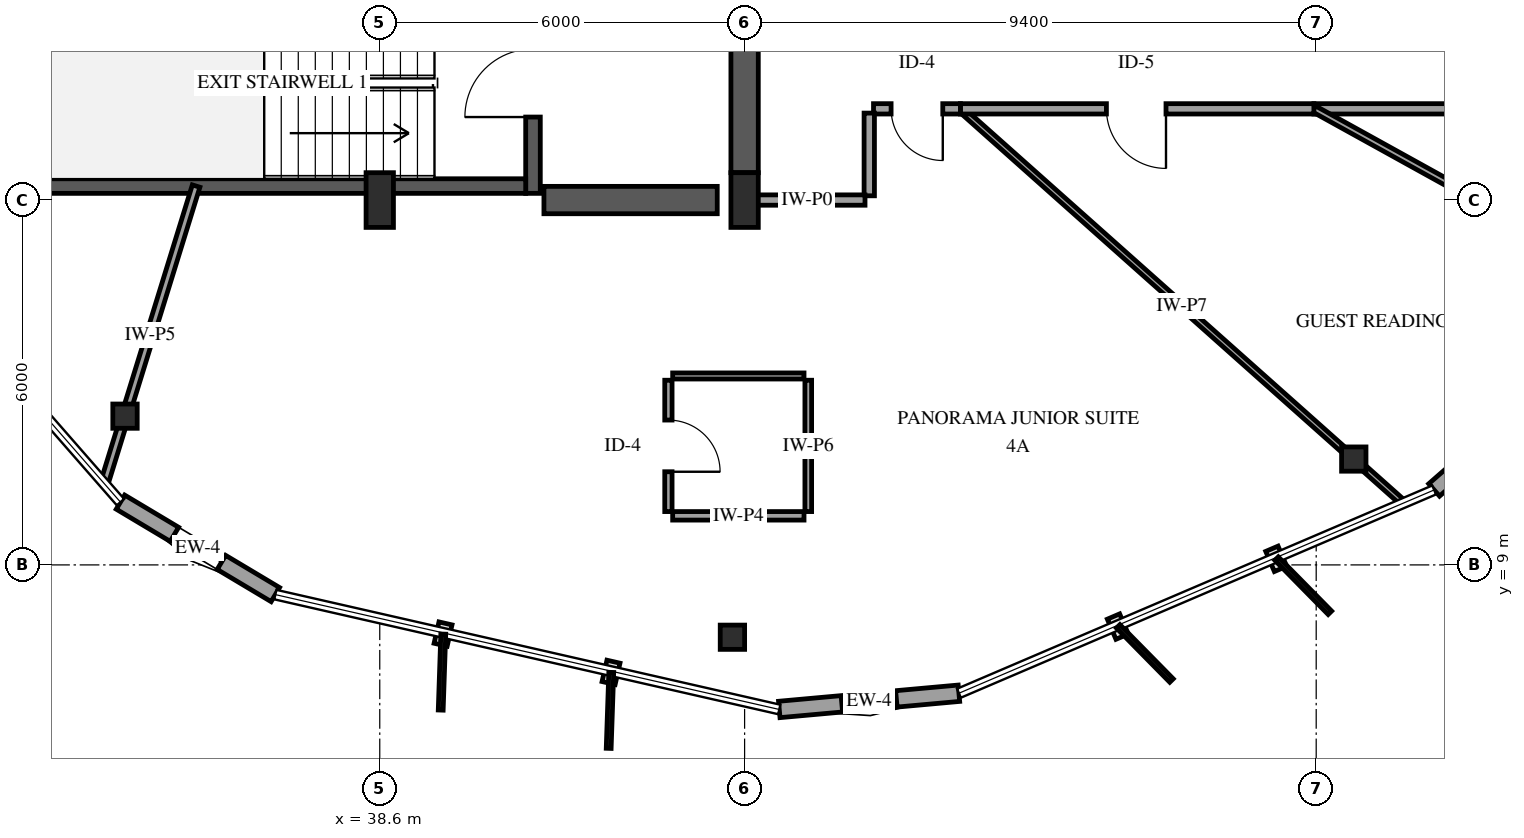
"""IFC4 building model, lengths in metres.
Left out: names, types, materials, properties, quantities, classifications, styles, units other than length and angle.
Written with IfcOpenShell. Run it as: python <this file> out.ifc"""

import sys

from ifc_helpers import new_model, si_unit, direction, frame, frame_2d, origin, origin_2d, place, context, subcontext, project, spatial, rectangle, i_section, extrude, element, fill, save


model = new_model("IFC4")
c1 = context("Model", 3, precision=1e-05, world=origin(), true_north=direction((0.0, 1.0)))
c2 = subcontext(c1, "Body", "Model", "MODEL_VIEW")
j1 = project(units=[si_unit("LENGTHUNIT", "METRE"), si_unit("PLANEANGLEUNIT", "RADIAN")], contexts=[c1])
p1 = place(None, origin())
s1 = spatial("IfcSite", under=j1, at=p1, CompositionType="ELEMENT")
p2 = place(p1, origin())
s2 = spatial("IfcBuilding", under=s1, at=p2, CompositionType="ELEMENT")
p3 = place(p2, frame((0.0, 0.0, 250.0)))
s3 = spatial("IfcBuildingStorey", under=s2, at=p3, CompositionType="ELEMENT", Elevation=250.0)
p4 = place(p3, frame((41.12, 15.11, 0.0), z_axis=(0.0, 0.0, 1.0), x_axis=(0.0, 1.0, 0.0)))
e1 = element("IfcWall", 1, at=p4, inside=s3, PredefinedType="SHEAR", context=c2, shape_type="SweptSolid", body=[
    extrude(rectangle(XDim=3.63, YDim=0.24, at=frame_2d((1.815, 0.0))), origin(), (0.0, 0.0, 1.0), 3.75),
])
p5 = place(p4, frame((1.255, 0.0, 0.0)))
e2 = element("IfcOpeningElement", 2, at=p5, cuts=e1, PredefinedType="OPENING", context=c2, shape_type="SweptSolid", body=[
    extrude(rectangle(XDim=1.12, YDim=2.15, at=frame_2d((0.56, 1.075))), frame((0.0, 0.13, 0.0), z_axis=(0.0, -1.0, 0.0), x_axis=(1.0, 0.0, 0.0)), (0.0, 0.0, 1.0), 0.26),
])
p6 = place(p3, frame((33.0, 15.23, 0.0), z_axis=(0.0, 0.0, 1.0), x_axis=(1.0, 0.0, 0.0)))
e3 = element("IfcWall", 3, at=p6, inside=s3, PredefinedType="SHEAR", context=c2, shape_type="SweptSolid", body=[
    extrude(rectangle(XDim=8.0, YDim=0.24, at=frame_2d((4.0, 0.0))), origin(), (0.0, 0.0, 1.0), 3.75),
])
p7 = place(p3, frame((41.3, 15.0, 0.0), z_axis=(0.0, 0.0, 1.0), x_axis=(1.0, 0.0, 0.0)))
e4 = element("IfcWall", 4, at=p7, inside=s3, PredefinedType="SHEAR", context=c2, shape_type="SweptSolid", body=[
    extrude(rectangle(XDim=2.85, YDim=0.45, at=frame_2d((1.425, 0.0))), origin(), (0.0, 0.0, 1.0), 3.75),
])
p8 = place(p3, frame((44.6, 15.45, 0.0), z_axis=(0.0, 0.0, 1.0), x_axis=(0.0, 1.0, 0.0)))
e5 = element("IfcWall", 5, at=p8, inside=s3, PredefinedType="SHEAR", context=c2, shape_type="SweptSolid", body=[
    extrude(rectangle(XDim=6.35, YDim=0.45, at=frame_2d((3.175, 0.0))), origin(), (0.0, 0.0, 1.0), 3.75),
])
for number, where, z_axis, x_axis in (
    (6, (38.6, 15.0, 0.0), (0.0, 0.0, 1.0), (1.0, 0.0, 0.0)),
    (7, (44.6, 15.0, 0.0), (0.0, 0.0, 1.0), (1.0, 0.0, 0.0)),
):
    element("IfcColumn", number, at=place(p3, frame(where, z_axis=z_axis, x_axis=x_axis)), inside=s3, PredefinedType="PILASTER", context=c2, shape_type="SweptSolid", body=[
        extrude(rectangle(XDim=0.45, YDim=0.9, at=origin_2d()), origin(), (0.0, 0.0, 1.0), 3.75),
    ])
for number, where, z_axis, x_axis in (
    (8, (34.411, 11.446, 0.0), (0.0, 0.0, 1.0), (1.0, 0.0, 0.0)),
    (9, (44.4, 7.811, 0.0), (0.0, 0.0, 1.0), (1.0, 0.0, 0.0)),
    (10, (54.618, 10.74, 0.0), (0.0, 0.0, 1.0), (1.0, 0.0, 0.0)),
):
    element("IfcColumn", number, at=place(p3, frame(where, z_axis=z_axis, x_axis=x_axis)), inside=s3, PredefinedType="COLUMN", context=c2, shape_type="SweptSolid", body=[
        extrude(i_section(OverallWidth=0.401, OverallDepth=0.399, WebThickness=0.025, FlangeThickness=0.04, FilletRadius=0.038, at=origin_2d()), origin(), (0.0, 0.0, 1.0), 3.75),
    ])
p9 = place(p3, frame((34.336, 10.032, 0.0), z_axis=(0.0, 0.0, 1.0), x_axis=(0.858609177154, -0.512630745183, 0.0)))
e11 = element("IfcWall", 11, at=p9, inside=s3, PredefinedType="SOLIDWALL", context=c2, shape_type="SweptSolid", body=[
    extrude(rectangle(XDim=2.967, YDim=0.27, at=frame_2d((1.483, 0.0))), origin(), (0.0, 0.0, 1.0), 2.829),
])
p10 = place(p9, frame((1.033, 0.0, 0.75)))
e12 = element("IfcOpeningElement", 12, at=p10, cuts=e11, PredefinedType="OPENING", context=c2, shape_type="SweptSolid", body=[
    extrude(rectangle(XDim=0.9, YDim=1.5, at=frame_2d((0.45, 0.75))), frame((0.0, 0.145, 0.0), z_axis=(0.0, -1.0, 0.0), x_axis=(1.0, 0.0, 0.0)), (0.0, 0.0, 1.0), 0.29),
])
p11 = place(p3, frame((45.17, 6.623, 0.0), z_axis=(0.0, 0.0, 1.0), x_axis=(0.995946323989, 0.089949539921, 0.0)))
e13 = element("IfcWall", 13, at=p11, inside=s3, PredefinedType="SOLIDWALL", context=c2, shape_type="SweptSolid", body=[
    extrude(rectangle(XDim=2.967, YDim=0.27, at=frame_2d((1.483, 0.0))), origin(), (0.0, 0.0, 1.0), 2.829),
])
p12 = place(p11, frame((1.033, 0.0, 0.75)))
e14 = element("IfcOpeningElement", 14, at=p12, cuts=e13, PredefinedType="OPENING", context=c2, shape_type="SweptSolid", body=[
    extrude(rectangle(XDim=0.9, YDim=1.5, at=frame_2d((0.45, 0.75))), frame((0.0, 0.145, 0.0), z_axis=(0.0, -1.0, 0.0), x_axis=(1.0, 0.0, 0.0)), (0.0, 0.0, 1.0), 0.29),
])
p13 = place(p3, frame((55.94, 10.233, 0.0), z_axis=(0.0, 0.0, 1.0), x_axis=(0.75288250817, 0.658154942921, 0.0)))
e15 = element("IfcWall", 15, at=p13, inside=s3, PredefinedType="SOLIDWALL", context=c2, shape_type="SweptSolid", body=[
    extrude(rectangle(XDim=2.967, YDim=0.27, at=frame_2d((1.483, 0.0))), origin(), (0.0, 0.0, 1.0), 2.829),
])
p14 = place(p13, frame((1.033, 0.0, 0.75)))
e16 = element("IfcOpeningElement", 16, at=p14, cuts=e15, PredefinedType="OPENING", context=c2, shape_type="SweptSolid", body=[
    extrude(rectangle(XDim=0.9, YDim=1.5, at=frame_2d((0.45, 0.75))), frame((0.0, 0.145, 0.0), z_axis=(0.0, -1.0, 0.0), x_axis=(1.0, 0.0, 0.0)), (0.0, 0.0, 1.0), 0.29),
])
p15 = place(p3, frame((48.149, 16.5, 0.0), z_axis=(0.0, 0.0, 1.0), x_axis=(0.746947801676, -0.664882682562, 0.0)))
e17 = element("IfcWall", 17, at=p15, inside=s3, PredefinedType="PARTITIONING", context=c2, shape_type="SweptSolid", body=[
    extrude(rectangle(XDim=9.752, YDim=0.1, at=frame_2d((4.876, 0.0))), origin(), (0.0, 0.0, 1.0), 2.828),
])
p16 = place(p3, frame((60.749, 16.5, 0.0), z_axis=(0.0, 0.0, 1.0), x_axis=(-1.0, 0.0, 0.0)))
e18 = element("IfcWall", 18, at=p16, inside=s3, PredefinedType="PARTITIONING", context=c2, shape_type="SweptSolid", body=[
    extrude(rectangle(XDim=6.787, YDim=0.17, at=frame_2d((3.394, 0.0))), origin(), (0.0, 0.0, 1.0), 3.45),
])
p17 = place(p16, frame((2.918, 0.0, 0.0)))
e19 = element("IfcOpeningElement", 19, at=p17, cuts=e18, PredefinedType="OPENING", context=c2, shape_type="SweptSolid", body=[
    extrude(rectangle(XDim=0.98, YDim=2.15, at=frame_2d((0.49, 1.075))), frame((0.0, 0.095, 0.0), z_axis=(0.0, -1.0, 0.0), x_axis=(1.0, 0.0, 0.0)), (0.0, 0.0, 1.0), 0.19),
])
p18 = place(p3, frame((53.962, 16.5, 0.0), z_axis=(0.0, 0.0, 1.0), x_axis=(0.874991400217, -0.484138461131, 0.0)))
e20 = element("IfcWall", 20, at=p18, inside=s3, PredefinedType="PARTITIONING", context=c2, shape_type="SweptSolid", body=[
    extrude(rectangle(XDim=5.831, YDim=0.11, at=frame_2d((2.916, 0.0))), origin(), (0.0, 0.0, 1.0), 3.45),
])
p19 = place(p3, frame((53.962, 16.5, 0.0), z_axis=(0.0, 0.0, 1.0), x_axis=(-1.0, 0.0, 0.0)))
e21 = element("IfcWall", 21, at=p19, inside=s3, PredefinedType="PARTITIONING", context=c2, shape_type="SweptSolid", body=[
    extrude(rectangle(XDim=5.813, YDim=0.17, at=frame_2d((2.906, 0.0))), origin(), (0.0, 0.0, 1.0), 3.45),
])
p20 = place(p19, frame((2.432, 0.0, 0.0)))
e22 = element("IfcOpeningElement", 22, at=p20, cuts=e21, PredefinedType="OPENING", context=c2, shape_type="SweptSolid", body=[
    extrude(rectangle(XDim=0.98, YDim=2.15, at=frame_2d((0.49, 1.075))), frame((0.0, 0.095, 0.0), z_axis=(0.0, -1.0, 0.0), x_axis=(1.0, 0.0, 0.0)), (0.0, 0.0, 1.0), 0.19),
])
p21 = place(p3, frame((35.58, 15.23, 0.0), z_axis=(0.0, 0.0, 1.0), x_axis=(-0.295281740196, -0.95541022284, 0.0)))
e23 = element("IfcWall", 23, at=p21, inside=s3, PredefinedType="PARTITIONING", context=c2, shape_type="SweptSolid", body=[
    extrude(rectangle(XDim=5.12, YDim=0.13, at=frame_2d((2.56, 0.0))), origin(), (0.0, 0.0, 1.0), 2.745),
])
p22 = place(p3, frame((43.347, 12.037, 0.0), z_axis=(0.0, 0.0, 1.0), x_axis=(0.0, -1.0, 0.0)))
e24 = element("IfcWall", 24, at=p22, inside=s3, PredefinedType="PARTITIONING", context=c2, shape_type="SweptSolid", body=[
    extrude(rectangle(XDim=2.16, YDim=0.12, at=frame_2d((1.08, 0.0))), origin(), (0.0, 0.0, 1.0), 3.45),
])
p23 = place(p22, frame((0.655, 0.0, 0.0)))
e25 = element("IfcOpeningElement", 25, at=p23, cuts=e24, PredefinedType="OPENING", context=c2, shape_type="SweptSolid", body=[
    extrude(rectangle(XDim=0.85, YDim=2.1, at=frame_2d((0.425, 1.05))), frame((0.0, 0.07, 0.0), z_axis=(0.0, -1.0, 0.0), x_axis=(1.0, 0.0, 0.0)), (0.0, 0.0, 1.0), 0.14),
])
p24 = place(p3, frame((45.647, 9.877, 0.0), z_axis=(0.0, 0.0, 1.0), x_axis=(0.0, 1.0, 0.0)))
e26 = element("IfcWall", 26, at=p24, inside=s3, PredefinedType="PARTITIONING", context=c2, shape_type="SweptSolid", body=[
    extrude(rectangle(XDim=2.16, YDim=0.11, at=frame_2d((1.08, 0.0))), origin(), (0.0, 0.0, 1.0), 3.45),
])
p25 = place(p3, frame((45.577, 12.107, 0.0), z_axis=(0.0, 0.0, 1.0), x_axis=(-1.0, 0.0, 0.0)))
e27 = element("IfcWall", 27, at=p25, inside=s3, PredefinedType="PARTITIONING", context=c2, shape_type="SweptSolid", body=[
    extrude(rectangle(XDim=2.16, YDim=0.1, at=frame_2d((1.08, 0.0))), origin(), (0.0, 0.0, 1.0), 3.45),
])
p26 = place(p3, frame((43.417, 9.807, 0.0), z_axis=(0.0, 0.0, 1.0), x_axis=(1.0, 0.0, 0.0)))
e28 = element("IfcWall", 28, at=p26, inside=s3, PredefinedType="PARTITIONING", context=c2, shape_type="SweptSolid", body=[
    extrude(rectangle(XDim=2.16, YDim=0.14, at=frame_2d((1.08, 0.0))), origin(), (0.0, 0.0, 1.0), 3.45),
])
p27 = place(p3, frame((48.149, 16.5, 0.0), z_axis=(0.0, 0.0, 1.0), x_axis=(-1.0, 0.0, 0.0)))
e29 = element("IfcWall", 29, at=p27, inside=s3, PredefinedType="PARTITIONING", context=c2, shape_type="SweptSolid", body=[
    extrude(rectangle(XDim=1.429, YDim=0.17, at=frame_2d((0.714, 0.0))), origin(), (0.0, 0.0, 1.0), 3.45),
])
p28 = place(p27, frame((0.29, 0.0, 0.0)))
e30 = element("IfcOpeningElement", 30, at=p28, cuts=e29, PredefinedType="OPENING", context=c2, shape_type="SweptSolid", body=[
    extrude(rectangle(XDim=0.85, YDim=2.1, at=frame_2d((0.425, 1.05))), frame((0.0, 0.095, 0.0), z_axis=(0.0, -1.0, 0.0), x_axis=(1.0, 0.0, 0.0)), (0.0, 0.0, 1.0), 0.19),
])
p29 = place(p3, frame((46.65, 16.43, 0.0), z_axis=(0.0, 0.0, 1.0), x_axis=(0.0, -1.0, 0.0)))
e31 = element("IfcWall", 31, at=p29, inside=s3, PredefinedType="PARTITIONING", context=c2, shape_type="SweptSolid", body=[
    extrude(rectangle(XDim=1.36, YDim=0.17, at=frame_2d((0.68, 0.0))), origin(), (0.0, 0.0, 1.0), 3.45),
])
p30 = place(p3, frame((46.58, 15.0, 0.0), z_axis=(0.0, 0.0, 1.0), x_axis=(-1.0, 0.0, 0.0)))
e32 = element("IfcWall", 32, at=p30, inside=s3, PredefinedType="PARTITIONING", context=c2, shape_type="SweptSolid", body=[
    extrude(rectangle(XDim=1.139, YDim=0.17, at=frame_2d((0.57, 0.0))), origin(), (0.0, 0.0, 1.0), 3.45),
])
p31 = place(p3, frame((45.439, 15.0, 0.0), z_axis=(0.0, 0.0, 1.0), x_axis=(-1.0, 0.0, 0.0)))
e33 = element("IfcWall", 33, at=p31, inside=s3, PredefinedType="PARTITIONING", context=c2, shape_type="SweptSolid", body=[
    extrude(rectangle(XDim=0.769, YDim=0.17, at=frame_2d((0.385, 0.0))), origin(), (0.0, 0.0, 1.0), 3.45),
])
p32 = place(p10, origin())
e34 = element("IfcWindow", 34, at=p32, inside=s3, PartitioningType="SINGLE_PANEL", PredefinedType="WINDOW", context=c2, shape_type="SweptSolid", body=[
    extrude(rectangle(XDim=0.9, YDim=1.5, at=frame_2d((0.45, 0.75))), frame((0.0, 0.03, 0.0), z_axis=(0.0, -1.0, 0.0), x_axis=(1.0, 0.0, 0.0)), (0.0, 0.0, 1.0), 0.06),
])
fill(e12, e34)
p33 = place(p12, origin())
e35 = element("IfcWindow", 35, at=p33, inside=s3, PartitioningType="SINGLE_PANEL", PredefinedType="WINDOW", context=c2, shape_type="SweptSolid", body=[
    extrude(rectangle(XDim=0.9, YDim=1.5, at=frame_2d((0.45, 0.75))), frame((0.0, 0.03, 0.0), z_axis=(0.0, -1.0, 0.0), x_axis=(1.0, 0.0, 0.0)), (0.0, 0.0, 1.0), 0.06),
])
fill(e14, e35)
p34 = place(p5, origin())
e36 = element("IfcDoor", 36, at=p34, inside=s3, OperationType="SINGLE_SWING_LEFT", PredefinedType="DOOR", context=c2, shape_type="SweptSolid", body=[
    extrude(rectangle(XDim=1.12, YDim=2.15, at=frame_2d((0.56, 1.075))), frame((0.0, 0.025, 0.0), z_axis=(0.0, -1.0, 0.0), x_axis=(1.0, 0.0, 0.0)), (0.0, 0.0, 1.0), 0.05),
])
fill(e2, e36)
p35 = place(p20, origin())
e37 = element("IfcDoor", 37, at=p35, inside=s3, OperationType="SINGLE_SWING_LEFT", PredefinedType="DOOR", context=c2, shape_type="SweptSolid", body=[
    extrude(rectangle(XDim=0.98, YDim=2.15, at=frame_2d((0.49, 1.075))), frame((0.0, 0.025, 0.0), z_axis=(0.0, -1.0, 0.0), x_axis=(1.0, 0.0, 0.0)), (0.0, 0.0, 1.0), 0.05),
])
fill(e22, e37)
p36 = place(p23, origin())
e38 = element("IfcDoor", 38, at=p36, inside=s3, OperationType="SINGLE_SWING_RIGHT", PredefinedType="DOOR", context=c2, shape_type="SweptSolid", body=[
    extrude(rectangle(XDim=0.85, YDim=2.1, at=frame_2d((0.425, 1.05))), frame((0.0, 0.025, 0.0), z_axis=(0.0, -1.0, 0.0), x_axis=(1.0, 0.0, 0.0)), (0.0, 0.0, 1.0), 0.05),
])
fill(e25, e38)
p37 = place(p28, origin())
e39 = element("IfcDoor", 39, at=p37, inside=s3, OperationType="SINGLE_SWING_LEFT", PredefinedType="DOOR", context=c2, shape_type="SweptSolid", body=[
    extrude(rectangle(XDim=0.85, YDim=2.1, at=frame_2d((0.425, 1.05))), frame((0.0, 0.025, 0.0), z_axis=(0.0, -1.0, 0.0), x_axis=(1.0, 0.0, 0.0)), (0.0, 0.0, 1.0), 0.05),
])
fill(e30, e39)
save(model, sys.argv[1])
